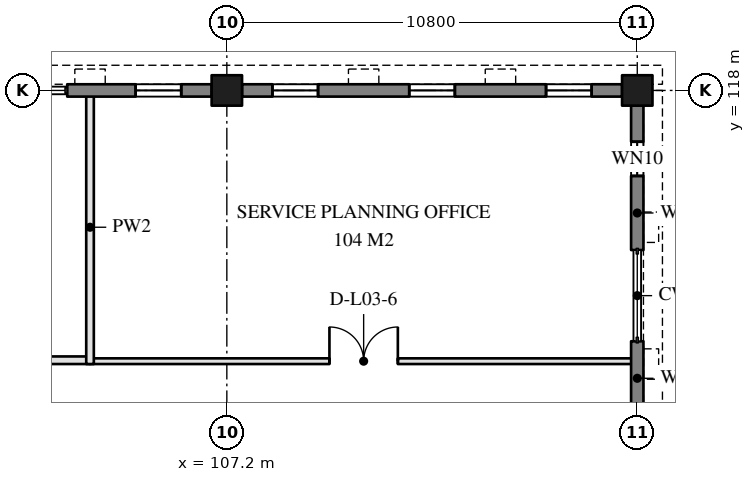
"""IFC4 building model, lengths in metres.
Left out: names, types, materials, properties, quantities, classifications, styles, units other than length and angle.
Written with IfcOpenShell. Run it as: python <this file> out.ifc"""

import sys

from ifc_helpers import new_model, si_unit, direction, frame, frame_2d, origin, origin_2d, place, context, subcontext, project, spatial, rectangle, extrude, element, fill, save


model = new_model("IFC4")
c1 = context("Model", 3, precision=1e-05, world=origin(), true_north=direction((0.0, 1.0)))
c2 = subcontext(c1, "Body", "Model", "MODEL_VIEW")
j1 = project(units=[si_unit("LENGTHUNIT", "METRE"), si_unit("PLANEANGLEUNIT", "RADIAN")], contexts=[c1])
p1 = place(None, origin())
s1 = spatial("IfcSite", under=j1, at=p1, CompositionType="ELEMENT")
p2 = place(p1, origin())
s2 = spatial("IfcBuilding", under=s1, at=p2, CompositionType="ELEMENT")
p3 = place(p2, frame((0.0, 0.0, 12.6)))
s3 = spatial("IfcBuildingStorey", under=s2, at=p3, CompositionType="ELEMENT", Elevation=12.6)
for number, where, z_axis, x_axis in (
    (1, (107.2, 118.0, 0.0), (0.0, 0.0, 1.0), (1.0, 0.0, 0.0)),
    (2, (118.0, 118.0, 0.0), (0.0, 0.0, 1.0), (1.0, 0.0, 0.0)),
):
    element("IfcColumn", number, at=place(p3, frame(where, z_axis=z_axis, x_axis=x_axis)), inside=s3, PredefinedType="COLUMN", context=c2, shape_type="SweptSolid", body=[
        extrude(rectangle(XDim=0.8, YDim=0.8, at=origin_2d()), origin(), (0.0, 0.0, 1.0), 3.9),
    ])
p4 = place(p3, frame((103.0, 118.0, 0.0), z_axis=(0.0, 0.0, 1.0), x_axis=(1.0, 0.0, 0.0)))
e3 = element("IfcWall", 3, at=p4, inside=s3, PredefinedType="SOLIDWALL", context=c2, shape_type="SweptSolid", body=[
    extrude(rectangle(XDim=3.8, YDim=0.325, at=frame_2d((1.9, 0.0))), origin(), (0.0, 0.0, 1.0), 2.8),
])
p5 = place(p4, frame((1.8, 0.0, 0.75)))
e4 = element("IfcOpeningElement", 4, at=p5, cuts=e3, PredefinedType="OPENING", context=c2, shape_type="SweptSolid", body=[
    extrude(rectangle(XDim=1.2, YDim=1.95, at=frame_2d((0.6, 0.975))), frame((0.0, 0.172, 0.0), z_axis=(0.0, -1.0, 0.0), x_axis=(1.0, 0.0, 0.0)), (0.0, 0.0, 1.0), 0.345),
])
p6 = place(p3, frame((107.6, 118.0, 0.0), z_axis=(0.0, 0.0, 1.0), x_axis=(1.0, 0.0, 0.0)))
e5 = element("IfcWall", 5, at=p6, inside=s3, PredefinedType="SOLIDWALL", context=c2, shape_type="SweptSolid", body=[
    extrude(rectangle(XDim=10.0, YDim=0.325, at=frame_2d((5.0, 0.0))), origin(), (0.0, 0.0, 1.0), 2.8),
])
p7 = place(p6, frame((0.8, 0.0, 0.75)))
e6 = element("IfcOpeningElement", 6, at=p7, cuts=e5, PredefinedType="OPENING", context=c2, shape_type="SweptSolid", body=[
    extrude(rectangle(XDim=1.2, YDim=1.95, at=frame_2d((0.6, 0.975))), frame((0.0, 0.172, 0.0), z_axis=(0.0, -1.0, 0.0), x_axis=(1.0, 0.0, 0.0)), (0.0, 0.0, 1.0), 0.345),
])
p8 = place(p6, frame((4.4, 0.0, 0.75)))
e7 = element("IfcOpeningElement", 7, at=p8, cuts=e5, PredefinedType="OPENING", context=c2, shape_type="SweptSolid", body=[
    extrude(rectangle(XDim=1.2, YDim=1.95, at=frame_2d((0.6, 0.975))), frame((0.0, 0.172, 0.0), z_axis=(0.0, -1.0, 0.0), x_axis=(1.0, 0.0, 0.0)), (0.0, 0.0, 1.0), 0.345),
])
p9 = place(p6, frame((8.0, 0.0, 0.75)))
e8 = element("IfcOpeningElement", 8, at=p9, cuts=e5, PredefinedType="OPENING", context=c2, shape_type="SweptSolid", body=[
    extrude(rectangle(XDim=1.2, YDim=1.95, at=frame_2d((0.6, 0.975))), frame((0.0, 0.172, 0.0), z_axis=(0.0, -1.0, 0.0), x_axis=(1.0, 0.0, 0.0)), (0.0, 0.0, 1.0), 0.345),
])
p10 = place(p3, frame((118.0, 107.6, 0.0), z_axis=(0.0, 0.0, 1.0), x_axis=(0.0, 1.0, 0.0)))
e9 = element("IfcWall", 9, at=p10, inside=s3, PredefinedType="SOLIDWALL", context=c2, shape_type="SweptSolid", body=[
    extrude(rectangle(XDim=3.8, YDim=0.325, at=frame_2d((1.9, 0.0))), origin(), (0.0, 0.0, 1.0), 2.8),
])
p11 = place(p10, frame((0.95, 0.0, 0.7)))
e10 = element("IfcOpeningElement", 10, at=p11, cuts=e9, PredefinedType="OPENING", context=c2, shape_type="SweptSolid", body=[
    extrude(rectangle(XDim=0.9, YDim=2.0, at=frame_2d((0.45, 1.0))), frame((0.0, 0.172, 0.0), z_axis=(0.0, -1.0, 0.0), x_axis=(1.0, 0.0, 0.0)), (0.0, 0.0, 1.0), 0.345),
])
p12 = place(p3, frame((118.0, 113.8, 0.0), z_axis=(0.0, 0.0, 1.0), x_axis=(0.0, 1.0, 0.0)))
e11 = element("IfcWall", 11, at=p12, inside=s3, PredefinedType="SOLIDWALL", context=c2, shape_type="SweptSolid", body=[
    extrude(rectangle(XDim=3.8, YDim=0.325, at=frame_2d((1.9, 0.0))), origin(), (0.0, 0.0, 1.0), 2.8),
])
p13 = place(p12, frame((1.95, 0.0, 0.7)))
e12 = element("IfcOpeningElement", 12, at=p13, cuts=e11, PredefinedType="OPENING", context=c2, shape_type="SweptSolid", body=[
    extrude(rectangle(XDim=0.9, YDim=2.0, at=frame_2d((0.45, 1.0))), frame((0.0, 0.172, 0.0), z_axis=(0.0, -1.0, 0.0), x_axis=(1.0, 0.0, 0.0)), (0.0, 0.0, 1.0), 0.345),
])
p14 = place(p3, frame((96.4, 110.9, 0.0), z_axis=(0.0, 0.0, 1.0), x_axis=(1.0, 0.0, 0.0)))
e13 = element("IfcWall", 13, at=p14, inside=s3, PredefinedType="PARTITIONING", context=c2, shape_type="SweptSolid", body=[
    extrude(rectangle(XDim=7.2, YDim=0.2, at=frame_2d((3.6, 0.0))), origin(), (0.0, 0.0, 1.0), 2.8),
])
p15 = place(p14, frame((3.1, 0.0, 0.0)))
e14 = element("IfcOpeningElement", 14, at=p15, cuts=e13, PredefinedType="OPENING", context=c2, shape_type="SweptSolid", body=[
    extrude(rectangle(XDim=1.0, YDim=2.1, at=frame_2d((0.5, 1.05))), frame((0.0, 0.11, 0.0), z_axis=(0.0, -1.0, 0.0), x_axis=(1.0, 0.0, 0.0)), (0.0, 0.0, 1.0), 0.22),
])
p16 = place(p3, frame((103.6, 110.875, 0.0), z_axis=(0.0, 0.0, 1.0), x_axis=(1.0, 0.0, 0.0)))
e15 = element("IfcWall", 15, at=p16, inside=s3, PredefinedType="PARTITIONING", context=c2, shape_type="SweptSolid", body=[
    extrude(rectangle(XDim=14.4, YDim=0.15, at=frame_2d((7.2, 0.0))), origin(), (0.0, 0.0, 1.0), 2.8),
])
p17 = place(p16, frame((6.3, 0.0, 0.0)))
e16 = element("IfcOpeningElement", 16, at=p17, cuts=e15, PredefinedType="OPENING", context=c2, shape_type="SweptSolid", body=[
    extrude(rectangle(XDim=1.8, YDim=2.1, at=frame_2d((0.9, 1.05))), frame((0.0, 0.085, 0.0), z_axis=(0.0, -1.0, 0.0), x_axis=(1.0, 0.0, 0.0)), (0.0, 0.0, 1.0), 0.17),
])
p18 = place(p3, frame((103.6, 110.8, 0.0), z_axis=(0.0, 0.0, 1.0), x_axis=(0.0, 1.0, 0.0)))
e17 = element("IfcWall", 17, at=p18, inside=s3, PredefinedType="PARTITIONING", context=c2, shape_type="SweptSolid", body=[
    extrude(rectangle(XDim=7.2, YDim=0.2, at=frame_2d((3.6, 0.0))), origin(), (0.0, 0.0, 1.0), 2.8),
])
p19 = place(p5, origin())
e18 = element("IfcWindow", 18, at=p19, inside=s3, PartitioningType="SINGLE_PANEL", PredefinedType="WINDOW", context=c2, shape_type="SweptSolid", body=[
    extrude(rectangle(XDim=1.2, YDim=1.95, at=frame_2d((0.6, 0.975))), frame((0.0, 0.03, 0.0), z_axis=(0.0, -1.0, 0.0), x_axis=(1.0, 0.0, 0.0)), (0.0, 0.0, 1.0), 0.06),
])
fill(e4, e18)
p20 = place(p7, origin())
e19 = element("IfcWindow", 19, at=p20, inside=s3, PartitioningType="SINGLE_PANEL", PredefinedType="WINDOW", context=c2, shape_type="SweptSolid", body=[
    extrude(rectangle(XDim=1.2, YDim=1.95, at=frame_2d((0.6, 0.975))), frame((0.0, 0.03, 0.0), z_axis=(0.0, -1.0, 0.0), x_axis=(1.0, 0.0, 0.0)), (0.0, 0.0, 1.0), 0.06),
])
fill(e6, e19)
p21 = place(p8, origin())
e20 = element("IfcWindow", 20, at=p21, inside=s3, PartitioningType="SINGLE_PANEL", PredefinedType="WINDOW", context=c2, shape_type="SweptSolid", body=[
    extrude(rectangle(XDim=1.2, YDim=1.95, at=frame_2d((0.6, 0.975))), frame((0.0, 0.03, 0.0), z_axis=(0.0, -1.0, 0.0), x_axis=(1.0, 0.0, 0.0)), (0.0, 0.0, 1.0), 0.06),
])
fill(e7, e20)
p22 = place(p9, origin())
e21 = element("IfcWindow", 21, at=p22, inside=s3, PartitioningType="SINGLE_PANEL", PredefinedType="WINDOW", context=c2, shape_type="SweptSolid", body=[
    extrude(rectangle(XDim=1.2, YDim=1.95, at=frame_2d((0.6, 0.975))), frame((0.0, 0.03, 0.0), z_axis=(0.0, -1.0, 0.0), x_axis=(1.0, 0.0, 0.0)), (0.0, 0.0, 1.0), 0.06),
])
fill(e8, e21)
p23 = place(p13, origin())
e22 = element("IfcWindow", 22, at=p23, inside=s3, PartitioningType="SINGLE_PANEL", PredefinedType="WINDOW", context=c2, shape_type="SweptSolid", body=[
    extrude(rectangle(XDim=0.9, YDim=2.0, at=frame_2d((0.45, 1.0))), frame((0.0, 0.03, 0.0), z_axis=(0.0, -1.0, 0.0), x_axis=(1.0, 0.0, 0.0)), (0.0, 0.0, 1.0), 0.06),
])
fill(e12, e22)
p24 = place(p17, origin())
e23 = element("IfcDoor", 23, at=p24, inside=s3, OperationType="DOUBLE_DOOR_DOUBLE_SWING", PredefinedType="DOOR", context=c2, shape_type="SweptSolid", body=[
    extrude(rectangle(XDim=1.8, YDim=2.1, at=frame_2d((0.9, 1.05))), frame((0.0, 0.025, 0.0), z_axis=(0.0, -1.0, 0.0), x_axis=(1.0, 0.0, 0.0)), (0.0, 0.0, 1.0), 0.05),
])
fill(e16, e23)
save(model, sys.argv[1])
